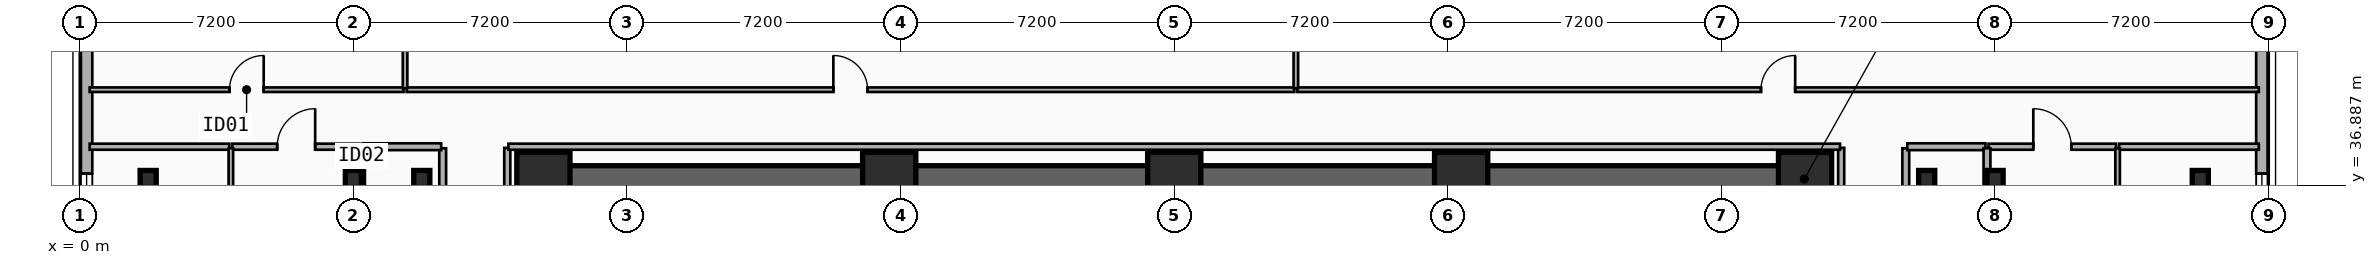
"""IFC4 building model, lengths in metres.
Left out: names, types, materials, properties, quantities, classifications, styles, units other than length and angle.
Written with IfcOpenShell. Run it as: python <this file> out.ifc"""

import sys

from ifc_helpers import new_model, si_unit, direction, frame, frame_2d, origin, origin_2d, place, context, subcontext, project, spatial, rectangle, i_section, extrude, element, fill, save


model = new_model("IFC4")
c1 = context("Model", 3, precision=1e-05, world=origin(), true_north=direction((0.0, 1.0)))
c2 = subcontext(c1, "Body", "Model", "MODEL_VIEW")
j1 = project(units=[si_unit("LENGTHUNIT", "METRE"), si_unit("PLANEANGLEUNIT", "RADIAN")], contexts=[c1])
p1 = place(None, origin())
s1 = spatial("IfcSite", under=j1, at=p1, CompositionType="ELEMENT")
p2 = place(p1, origin())
s2 = spatial("IfcBuilding", under=s1, at=p2, CompositionType="ELEMENT")
p3 = place(p2, frame((0.0, 0.0, 67.5)))
s3 = spatial("IfcBuildingStorey", under=s2, at=p3, CompositionType="ELEMENT", Elevation=67.5)
p4 = place(p3, frame((12.15, 37.05, 0.0), z_axis=(0.0, 0.0, 1.0), x_axis=(1.0, 0.0, 0.0)))
e1 = element("IfcWall", 1, at=p4, inside=s3, PredefinedType="SHEAR", context=c2, shape_type="SweptSolid", body=[
    extrude(rectangle(XDim=33.23, YDim=0.7, at=frame_2d((16.615, 0.0))), origin(), (0.0, 0.0, 1.0), 3.5),
])
for number, where, z_axis, x_axis in (
    (2, (12.2, 37.05, 0.0), (0.0, 0.0, 1.0), (1.0, 0.0, 0.0)),
    (3, (21.3, 37.05, 0.0), (0.0, 0.0, 1.0), (1.0, 0.0, 0.0)),
    (4, (28.8, 37.05, 0.0), (0.0, 0.0, 1.0), (1.0, 0.0, 0.0)),
    (5, (36.35, 37.05, 0.0), (0.0, 0.0, 1.0), (1.0, 0.0, 0.0)),
    (6, (45.4, 37.05, 0.0), (0.0, 0.0, 1.0), (1.0, 0.0, 0.0)),
):
    element("IfcColumn", number, at=place(p3, frame(where, z_axis=z_axis, x_axis=x_axis)), inside=s3, PredefinedType="COLUMN", context=c2, shape_type="SweptSolid", body=[
        extrude(rectangle(XDim=1.4, YDim=1.4, at=origin_2d()), origin(), (0.0, 0.0, 1.0), 3.5),
    ])
for number, where, z_axis, x_axis in (
    (7, (9.0, 37.05, 0.0), (0.0, 0.0, 1.0), (1.0, 0.0, 0.0)),
    (8, (48.6, 37.05, 0.0), (0.0, 0.0, 1.0), (1.0, 0.0, 0.0)),
    (9, (1.8, 37.05, 0.0), (0.0, 0.0, 1.0), (1.0, 0.0, 0.0)),
    (10, (7.2, 37.05, 0.0), (0.0, 0.0, 1.0), (1.0, 0.0, 0.0)),
    (11, (50.4, 37.05, 0.0), (0.0, 0.0, 1.0), (1.0, 0.0, 0.0)),
    (12, (55.8, 37.05, 0.0), (0.0, 0.0, 1.0), (1.0, 0.0, 0.0)),
):
    element("IfcColumn", number, at=place(p3, frame(where, z_axis=z_axis, x_axis=x_axis)), inside=s3, PredefinedType="COLUMN", context=c2, shape_type="SweptSolid", body=[
        extrude(i_section(OverallWidth=0.424, OverallDepth=0.45, WebThickness=0.041, FlangeThickness=0.065, FilletRadius=0.015, at=origin_2d()), origin(), (0.0, 0.0, 1.0), 3.5),
    ])
p5 = place(p3, frame((57.42, 41.0, 0.0), z_axis=(0.0, 0.0, 1.0), x_axis=(0.0, -1.0, 0.0)))
e13 = element("IfcWall", 13, at=p5, inside=s3, PredefinedType="SOLIDWALL", context=c2, shape_type="SweptSolid", body=[
    extrude(rectangle(XDim=15.2, YDim=0.3, at=frame_2d((7.6, 0.0))), origin(), (0.0, 0.0, 1.0), 3.24),
])
p6 = place(p5, frame((8.781, 0.0, 0.48)))
e14 = element("IfcOpeningElement", 14, at=p6, cuts=e13, PredefinedType="OPENING", context=c2, shape_type="SweptSolid", body=[
    extrude(rectangle(XDim=1.4, YDim=1.8, at=frame_2d((0.7, 0.9))), frame((0.0, 0.16, 0.0), z_axis=(0.0, -1.0, 0.0), x_axis=(1.0, 0.0, 0.0)), (0.0, 0.0, 1.0), 0.32),
])
p7 = place(p5, frame((10.94, 0.0, 0.48)))
e15 = element("IfcOpeningElement", 15, at=p7, cuts=e13, PredefinedType="OPENING", context=c2, shape_type="SweptSolid", body=[
    extrude(rectangle(XDim=1.4, YDim=1.8, at=frame_2d((0.7, 0.9))), frame((0.0, 0.16, 0.0), z_axis=(0.0, -1.0, 0.0), x_axis=(1.0, 0.0, 0.0)), (0.0, 0.0, 1.0), 0.32),
])
p8 = place(p5, frame((3.807, 0.0, 0.48)))
e16 = element("IfcOpeningElement", 16, at=p8, cuts=e13, PredefinedType="OPENING", context=c2, shape_type="SweptSolid", body=[
    extrude(rectangle(XDim=1.4, YDim=1.8, at=frame_2d((0.7, 0.9))), frame((0.0, 0.16, 0.0), z_axis=(0.0, -1.0, 0.0), x_axis=(1.0, 0.0, 0.0)), (0.0, 0.0, 1.0), 0.32),
])
p9 = place(p5, frame((5.614, 0.0, 0.48)))
e17 = element("IfcOpeningElement", 17, at=p9, cuts=e13, PredefinedType="OPENING", context=c2, shape_type="SweptSolid", body=[
    extrude(rectangle(XDim=1.4, YDim=1.8, at=frame_2d((0.7, 0.9))), frame((0.0, 0.16, 0.0), z_axis=(0.0, -1.0, 0.0), x_axis=(1.0, 0.0, 0.0)), (0.0, 0.0, 1.0), 0.32),
])
p10 = place(p3, frame((0.18, 25.8, 0.0), z_axis=(0.0, 0.0, 1.0), x_axis=(0.0, 1.0, 0.0)))
e18 = element("IfcWall", 18, at=p10, inside=s3, PredefinedType="SOLIDWALL", context=c2, shape_type="SweptSolid", body=[
    extrude(rectangle(XDim=15.2, YDim=0.3, at=frame_2d((7.6, 0.0))), origin(), (0.0, 0.0, 1.0), 3.24),
])
p11 = place(p10, frame((2.86, 0.0, 0.48)))
e19 = element("IfcOpeningElement", 19, at=p11, cuts=e18, PredefinedType="OPENING", context=c2, shape_type="SweptSolid", body=[
    extrude(rectangle(XDim=1.4, YDim=1.8, at=frame_2d((0.7, 0.9))), frame((0.0, 0.16, 0.0), z_axis=(0.0, -1.0, 0.0), x_axis=(1.0, 0.0, 0.0)), (0.0, 0.0, 1.0), 0.32),
])
p12 = place(p10, frame((5.019, 0.0, 0.48)))
e20 = element("IfcOpeningElement", 20, at=p12, cuts=e18, PredefinedType="OPENING", context=c2, shape_type="SweptSolid", body=[
    extrude(rectangle(XDim=1.4, YDim=1.8, at=frame_2d((0.7, 0.9))), frame((0.0, 0.16, 0.0), z_axis=(0.0, -1.0, 0.0), x_axis=(1.0, 0.0, 0.0)), (0.0, 0.0, 1.0), 0.32),
])
p13 = place(p10, frame((8.186, 0.0, 0.48)))
e21 = element("IfcOpeningElement", 21, at=p13, cuts=e18, PredefinedType="OPENING", context=c2, shape_type="SweptSolid", body=[
    extrude(rectangle(XDim=1.4, YDim=1.8, at=frame_2d((0.7, 0.9))), frame((0.0, 0.16, 0.0), z_axis=(0.0, -1.0, 0.0), x_axis=(1.0, 0.0, 0.0)), (0.0, 0.0, 1.0), 0.32),
])
p14 = place(p10, frame((9.993, 0.0, 0.48)))
e22 = element("IfcOpeningElement", 22, at=p14, cuts=e18, PredefinedType="OPENING", context=c2, shape_type="SweptSolid", body=[
    extrude(rectangle(XDim=1.4, YDim=1.8, at=frame_2d((0.7, 0.9))), frame((0.0, 0.16, 0.0), z_axis=(0.0, -1.0, 0.0), x_axis=(1.0, 0.0, 0.0)), (0.0, 0.0, 1.0), 0.32),
])
for number, where, z_axis, x_axis in (
    (23, (9.55, 34.232, 0.0), (0.0, 0.0, 1.0), (0.0, 1.0, 0.0)),
    (24, (48.05, 34.232, 0.0), (0.0, 0.0, 1.0), (0.0, 1.0, 0.0)),
):
    element("IfcWall", number, at=place(p3, frame(where, z_axis=z_axis, x_axis=x_axis)), inside=s3, PredefinedType="PLUMBINGWALL", context=c2, shape_type="SweptSolid", body=[
        extrude(rectangle(XDim=3.628, YDim=0.18, at=frame_2d((1.814, 0.0))), origin(), (0.0, 0.0, 1.0), 2.72),
    ])
p15 = place(p3, frame((4.016, 37.9, 0.0), z_axis=(0.0, 0.0, 1.0), x_axis=(1.0, 0.0, 0.0)))
e25 = element("IfcWall", 25, at=p15, inside=s3, PredefinedType="PARTITIONING", context=c2, shape_type="SweptSolid", body=[
    extrude(rectangle(XDim=3.357, YDim=0.16, at=frame_2d((1.678, 0.0))), origin(), (0.0, 0.0, 1.0), 3.24),
])
p16 = place(p15, frame((1.178, 0.0, 0.0)))
e26 = element("IfcOpeningElement", 26, at=p16, cuts=e25, PredefinedType="OPENING", context=c2, shape_type="SweptSolid", body=[
    extrude(rectangle(XDim=1.0, YDim=2.15, at=frame_2d((0.5, 1.075))), frame((0.0, 0.09, 0.0), z_axis=(0.0, -1.0, 0.0), x_axis=(1.0, 0.0, 0.0)), (0.0, 0.0, 1.0), 0.18),
])
p17 = place(p3, frame((7.453, 37.9, 0.0), z_axis=(0.0, 0.0, 1.0), x_axis=(1.0, 0.0, 0.0)))
e27 = element("IfcWall", 27, at=p17, inside=s3, PredefinedType="PLUMBINGWALL", context=c2, shape_type="SweptSolid", body=[
    extrude(rectangle(XDim=2.057, YDim=0.18, at=frame_2d((1.029, 0.0))), origin(), (0.0, 0.0, 1.0), 3.24),
])
p18 = place(p3, frame((0.26, 37.9, 0.0), z_axis=(0.0, 0.0, 1.0), x_axis=(1.0, 0.0, 0.0)))
e28 = element("IfcWall", 28, at=p18, inside=s3, PredefinedType="PARTITIONING", context=c2, shape_type="SweptSolid", body=[
    extrude(rectangle(XDim=3.676, YDim=0.16, at=frame_2d((1.838, 0.0))), origin(), (0.0, 0.0, 1.0), 3.24),
])
p19 = place(p3, frame((50.227, 37.9, 0.0), z_axis=(0.0, 0.0, 1.0), x_axis=(1.0, 0.0, 0.0)))
e29 = element("IfcWall", 29, at=p19, inside=s3, PredefinedType="PARTITIONING", context=c2, shape_type="SweptSolid", body=[
    extrude(rectangle(XDim=3.357, YDim=0.16, at=frame_2d((1.678, 0.0))), origin(), (0.0, 0.0, 1.0), 3.24),
])
p20 = place(p19, frame((1.178, 0.0, 0.0)))
e30 = element("IfcOpeningElement", 30, at=p20, cuts=e29, PredefinedType="OPENING", context=c2, shape_type="SweptSolid", body=[
    extrude(rectangle(XDim=1.0, YDim=2.15, at=frame_2d((0.5, 1.075))), frame((0.0, 0.09, 0.0), z_axis=(0.0, -1.0, 0.0), x_axis=(1.0, 0.0, 0.0)), (0.0, 0.0, 1.0), 0.18),
])
p21 = place(p3, frame((48.09, 37.9, 0.0), z_axis=(0.0, 0.0, 1.0), x_axis=(1.0, 0.0, 0.0)))
e31 = element("IfcWall", 31, at=p21, inside=s3, PredefinedType="PLUMBINGWALL", context=c2, shape_type="SweptSolid", body=[
    extrude(rectangle(XDim=2.057, YDim=0.18, at=frame_2d((1.028, 0.0))), origin(), (0.0, 0.0, 1.0), 3.24),
])
p22 = place(p3, frame((53.664, 37.9, 0.0), z_axis=(0.0, 0.0, 1.0), x_axis=(1.0, 0.0, 0.0)))
e32 = element("IfcWall", 32, at=p22, inside=s3, PredefinedType="PARTITIONING", context=c2, shape_type="SweptSolid", body=[
    extrude(rectangle(XDim=3.676, YDim=0.16, at=frame_2d((1.838, 0.0))), origin(), (0.0, 0.0, 1.0), 3.24),
])
p23 = place(p3, frame((0.26, 39.4, 0.0), z_axis=(0.0, 0.0, 1.0), x_axis=(1.0, 0.0, 0.0)))
e33 = element("IfcWall", 33, at=p23, inside=s3, PredefinedType="PARTITIONING", context=c2, shape_type="SweptSolid", body=[
    extrude(rectangle(XDim=8.26, YDim=0.12, at=frame_2d((4.13, 0.0))), origin(), (0.0, 0.0, 1.0), 3.24),
])
p24 = place(p23, frame((3.68, 0.0, 0.0)))
e34 = element("IfcOpeningElement", 34, at=p24, cuts=e33, PredefinedType="OPENING", context=c2, shape_type="SweptSolid", body=[
    extrude(rectangle(XDim=0.9, YDim=2.1, at=frame_2d((0.45, 1.05))), frame((0.0, 0.07, 0.0), z_axis=(0.0, -1.0, 0.0), x_axis=(1.0, 0.0, 0.0)), (0.0, 0.0, 1.0), 0.14),
])
p25 = place(p3, frame((8.6, 39.4, 0.0), z_axis=(0.0, 0.0, 1.0), x_axis=(1.0, 0.0, 0.0)))
e35 = element("IfcWall", 35, at=p25, inside=s3, PredefinedType="PARTITIONING", context=c2, shape_type="SweptSolid", body=[
    extrude(rectangle(XDim=23.36, YDim=0.12, at=frame_2d((11.68, 0.0))), origin(), (0.0, 0.0, 1.0), 3.24),
])
p26 = place(p25, frame((11.23, 0.0, 0.0)))
e36 = element("IfcOpeningElement", 36, at=p26, cuts=e35, PredefinedType="OPENING", context=c2, shape_type="SweptSolid", body=[
    extrude(rectangle(XDim=0.9, YDim=2.1, at=frame_2d((0.45, 1.05))), frame((0.0, 0.07, 0.0), z_axis=(0.0, -1.0, 0.0), x_axis=(1.0, 0.0, 0.0)), (0.0, 0.0, 1.0), 0.14),
])
p27 = place(p3, frame((32.04, 39.4, 0.0), z_axis=(0.0, 0.0, 1.0), x_axis=(1.0, 0.0, 0.0)))
e37 = element("IfcWall", 37, at=p27, inside=s3, PredefinedType="PARTITIONING", context=c2, shape_type="SweptSolid", body=[
    extrude(rectangle(XDim=25.3, YDim=0.12, at=frame_2d((12.65, 0.0))), origin(), (0.0, 0.0, 1.0), 3.24),
])
p28 = place(p27, frame((12.2, 0.0, 0.0)))
e38 = element("IfcOpeningElement", 38, at=p28, cuts=e37, PredefinedType="OPENING", context=c2, shape_type="SweptSolid", body=[
    extrude(rectangle(XDim=0.9, YDim=2.1, at=frame_2d((0.45, 1.05))), frame((0.0, 0.07, 0.0), z_axis=(0.0, -1.0, 0.0), x_axis=(1.0, 0.0, 0.0)), (0.0, 0.0, 1.0), 0.14),
])
p29 = place(p3, frame((7.413, 34.232, 0.0), z_axis=(0.0, 0.0, 1.0), x_axis=(0.0, 1.0, 0.0)))
e39 = element("IfcWall", 39, at=p29, inside=s3, PredefinedType="PLUMBINGWALL", context=c2, shape_type="SweptSolid", body=[
    extrude(rectangle(XDim=3.628, YDim=0.18, at=frame_2d((1.814, 0.0))), origin(), (0.0, 0.0, 1.0), 2.57),
])
p30 = place(p29, frame((1.389, 0.0, 0.0)))
e40 = element("IfcOpeningElement", 40, at=p30, cuts=e39, PredefinedType="OPENING", context=c2, shape_type="SweptSolid", body=[
    extrude(rectangle(XDim=0.85, YDim=2.1, at=frame_2d((0.425, 1.05))), frame((0.0, 0.1, 0.0), z_axis=(0.0, -1.0, 0.0), x_axis=(1.0, 0.0, 0.0)), (0.0, 0.0, 1.0), 0.2),
])
p31 = place(p3, frame((3.976, 33.319, 0.0), z_axis=(0.0, 0.0, 1.0), x_axis=(0.0, 1.0, 0.0)))
e41 = element("IfcWall", 41, at=p31, inside=s3, PredefinedType="PARTITIONING", context=c2, shape_type="SweptSolid", body=[
    extrude(rectangle(XDim=4.541, YDim=0.12, at=frame_2d((2.271, 0.0))), origin(), (0.0, 0.0, 1.0), 2.72),
])
p32 = place(p31, frame((1.821, 0.0, 0.0)))
e42 = element("IfcOpeningElement", 42, at=p32, cuts=e41, PredefinedType="OPENING", context=c2, shape_type="SweptSolid", body=[
    extrude(rectangle(XDim=0.9, YDim=2.1, at=frame_2d((0.45, 1.05))), frame((0.0, 0.07, 0.0), z_axis=(0.0, -1.0, 0.0), x_axis=(1.0, 0.0, 0.0)), (0.0, 0.0, 1.0), 0.14),
])
p33 = place(p3, frame((50.187, 34.232, 0.0), z_axis=(0.0, 0.0, 1.0), x_axis=(0.0, 1.0, 0.0)))
e43 = element("IfcWall", 43, at=p33, inside=s3, PredefinedType="PLUMBINGWALL", context=c2, shape_type="SweptSolid", body=[
    extrude(rectangle(XDim=3.628, YDim=0.18, at=frame_2d((1.814, 0.0))), origin(), (0.0, 0.0, 1.0), 2.57),
])
p34 = place(p33, frame((1.389, 0.0, 0.0)))
e44 = element("IfcOpeningElement", 44, at=p34, cuts=e43, PredefinedType="OPENING", context=c2, shape_type="SweptSolid", body=[
    extrude(rectangle(XDim=0.85, YDim=2.1, at=frame_2d((0.425, 1.05))), frame((0.0, 0.1, 0.0), z_axis=(0.0, -1.0, 0.0), x_axis=(1.0, 0.0, 0.0)), (0.0, 0.0, 1.0), 0.2),
])
p35 = place(p3, frame((53.624, 33.319, 0.0), z_axis=(0.0, 0.0, 1.0), x_axis=(0.0, 1.0, 0.0)))
e45 = element("IfcWall", 45, at=p35, inside=s3, PredefinedType="PARTITIONING", context=c2, shape_type="SweptSolid", body=[
    extrude(rectangle(XDim=4.541, YDim=0.12, at=frame_2d((2.271, 0.0))), origin(), (0.0, 0.0, 1.0), 2.72),
])
p36 = place(p35, frame((1.821, 0.0, 0.0)))
e46 = element("IfcOpeningElement", 46, at=p36, cuts=e45, PredefinedType="OPENING", context=c2, shape_type="SweptSolid", body=[
    extrude(rectangle(XDim=0.9, YDim=2.1, at=frame_2d((0.45, 1.05))), frame((0.0, 0.07, 0.0), z_axis=(0.0, -1.0, 0.0), x_axis=(1.0, 0.0, 0.0)), (0.0, 0.0, 1.0), 0.14),
])
for number, where, z_axis, x_axis in (
    (47, (8.56, 39.44, 0.0), (0.0, 0.0, 1.0), (0.0, 1.0, 0.0)),
    (48, (32.0, 39.44, 0.0), (0.0, 0.0, 1.0), (0.0, 1.0, 0.0)),
):
    element("IfcWall", number, at=place(p3, frame(where, z_axis=z_axis, x_axis=x_axis)), inside=s3, PredefinedType="PARTITIONING", context=c2, shape_type="SweptSolid", body=[
        extrude(rectangle(XDim=5.5, YDim=0.12, at=frame_2d((2.75, 0.0))), origin(), (0.0, 0.0, 1.0), 3.24),
    ])
for number, where, z_axis, x_axis in (
    (49, (11.25, 27.63, 0.0), (0.0, 0.0, 1.0), (0.0, 1.0, 0.0)),
    (50, (46.35, 27.63, 0.0), (0.0, 0.0, 1.0), (0.0, 1.0, 0.0)),
):
    element("IfcWall", number, at=place(p3, frame(where, z_axis=z_axis, x_axis=x_axis)), inside=s3, PredefinedType="PARTITIONING", context=c2, shape_type="SweptSolid", body=[
        extrude(rectangle(XDim=10.24, YDim=0.16, at=frame_2d((5.12, 0.0))), origin(), (0.0, 0.0, 1.0), 2.72),
    ])
p37 = place(p3, frame((11.28, 37.9, 0.0), z_axis=(0.0, 0.0, 1.0), x_axis=(1.0, 0.0, 0.0)))
e51 = element("IfcWall", 51, at=p37, inside=s3, PredefinedType="PARTITIONING", context=c2, shape_type="SweptSolid", body=[
    extrude(rectangle(XDim=35.04, YDim=0.16, at=frame_2d((17.52, 0.0))), origin(), (0.0, 0.0, 1.0), 3.24),
])
p38 = place(p8, origin())
e52 = element("IfcWindow", 52, at=p38, inside=s3, PartitioningType="SINGLE_PANEL", PredefinedType="WINDOW", context=c2, shape_type="SweptSolid", body=[
    extrude(rectangle(XDim=1.4, YDim=1.8, at=frame_2d((0.7, 0.9))), frame((0.0, 0.03, 0.0), z_axis=(0.0, -1.0, 0.0), x_axis=(1.0, 0.0, 0.0)), (0.0, 0.0, 1.0), 0.06),
])
fill(e16, e52)
p39 = place(p14, origin())
e53 = element("IfcWindow", 53, at=p39, inside=s3, PartitioningType="SINGLE_PANEL", PredefinedType="WINDOW", context=c2, shape_type="SweptSolid", body=[
    extrude(rectangle(XDim=1.4, YDim=1.8, at=frame_2d((0.7, 0.9))), frame((0.0, 0.03, 0.0), z_axis=(0.0, -1.0, 0.0), x_axis=(1.0, 0.0, 0.0)), (0.0, 0.0, 1.0), 0.06),
])
fill(e22, e53)
p40 = place(p16, origin())
e54 = element("IfcDoor", 54, at=p40, inside=s3, OperationType="SINGLE_SWING_RIGHT", PredefinedType="DOOR", context=c2, shape_type="SweptSolid", body=[
    extrude(rectangle(XDim=1.0, YDim=2.15, at=frame_2d((0.5, 1.075))), frame((0.0, 0.025, 0.0), z_axis=(0.0, -1.0, 0.0), x_axis=(1.0, 0.0, 0.0)), (0.0, 0.0, 1.0), 0.05),
])
fill(e26, e54)
p41 = place(p20, origin())
e55 = element("IfcDoor", 55, at=p41, inside=s3, OperationType="SINGLE_SWING_LEFT", PredefinedType="DOOR", context=c2, shape_type="SweptSolid", body=[
    extrude(rectangle(XDim=1.0, YDim=2.15, at=frame_2d((0.5, 1.075))), frame((0.0, 0.025, 0.0), z_axis=(0.0, -1.0, 0.0), x_axis=(1.0, 0.0, 0.0)), (0.0, 0.0, 1.0), 0.05),
])
fill(e30, e55)
p42 = place(p24, origin())
e56 = element("IfcDoor", 56, at=p42, inside=s3, OperationType="SINGLE_SWING_RIGHT", PredefinedType="DOOR", context=c2, shape_type="SweptSolid", body=[
    extrude(rectangle(XDim=0.9, YDim=2.1, at=frame_2d((0.45, 1.05))), frame((0.0, 0.025, 0.0), z_axis=(0.0, -1.0, 0.0), x_axis=(1.0, 0.0, 0.0)), (0.0, 0.0, 1.0), 0.05),
])
fill(e34, e56)
p43 = place(p26, origin())
e57 = element("IfcDoor", 57, at=p43, inside=s3, OperationType="SINGLE_SWING_LEFT", PredefinedType="DOOR", context=c2, shape_type="SweptSolid", body=[
    extrude(rectangle(XDim=0.9, YDim=2.1, at=frame_2d((0.45, 1.05))), frame((0.0, 0.025, 0.0), z_axis=(0.0, -1.0, 0.0), x_axis=(1.0, 0.0, 0.0)), (0.0, 0.0, 1.0), 0.05),
])
fill(e36, e57)
p44 = place(p28, origin())
e58 = element("IfcDoor", 58, at=p44, inside=s3, OperationType="SINGLE_SWING_RIGHT", PredefinedType="DOOR", context=c2, shape_type="SweptSolid", body=[
    extrude(rectangle(XDim=0.9, YDim=2.1, at=frame_2d((0.45, 1.05))), frame((0.0, 0.025, 0.0), z_axis=(0.0, -1.0, 0.0), x_axis=(1.0, 0.0, 0.0)), (0.0, 0.0, 1.0), 0.05),
])
fill(e38, e58)
save(model, sys.argv[1])
